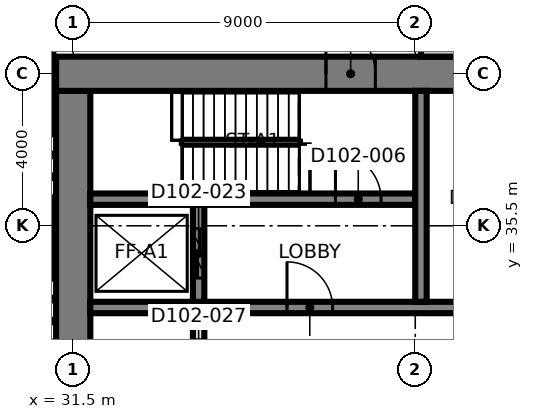
"""IFC4 building model, lengths in metres.
Left out: names, types, materials, properties, quantities, classifications, styles, units other than length and angle.
Written with IfcOpenShell. Run it as: python <this file> out.ifc"""

import sys

from ifc_helpers import new_model, si_unit, direction, frame, frame_2d, origin, place, context, subcontext, project, spatial, rectangle, extrude, element, fill, save


model = new_model("IFC4")
c1 = context("Model", 3, precision=1e-05, world=origin(), true_north=direction((0.0, 1.0)))
c2 = subcontext(c1, "Body", "Model", "MODEL_VIEW")
j1 = project(units=[si_unit("LENGTHUNIT", "METRE"), si_unit("PLANEANGLEUNIT", "RADIAN")], contexts=[c1])
p1 = place(None, origin())
s1 = spatial("IfcSite", under=j1, at=p1, CompositionType="ELEMENT")
p2 = place(p1, origin())
s2 = spatial("IfcBuilding", under=s1, at=p2, CompositionType="ELEMENT")
p3 = place(p2, origin())
s3 = spatial("IfcBuildingStorey", under=s2, at=p3, CompositionType="ELEMENT", Elevation=0.0)
p4 = place(p3, frame((31.5, 21.95, 0.0), z_axis=(0.0, 0.0, 1.0), x_axis=(0.0, 1.0, 0.0)))
e1 = element("IfcWall", 1, at=p4, inside=s3, PredefinedType="SHEAR", context=c2, shape_type="SweptSolid", body=[
    extrude(rectangle(XDim=17.1, YDim=0.9, at=frame_2d((8.55, 0.0))), origin(), (0.0, 0.0, 1.0), 8.0),
])
p5 = place(p3, frame((31.05, 39.5, 0.0), z_axis=(0.0, 0.0, 1.0), x_axis=(1.0, 0.0, 0.0)))
e2 = element("IfcWall", 2, at=p5, inside=s3, PredefinedType="SHEAR", context=c2, shape_type="SweptSolid", body=[
    extrude(rectangle(XDim=27.0, YDim=0.9, at=frame_2d((13.5, 0.0))), origin(), (0.0, 0.0, 1.0), 8.0),
])
p6 = place(p5, frame((7.1, 0.0, 0.0)))
e3 = element("IfcOpeningElement", 3, at=p6, cuts=e2, PredefinedType="OPENING", context=c2, shape_type="SweptSolid", body=[
    extrude(rectangle(XDim=1.3, YDim=2.1, at=frame_2d((0.65, 1.05))), frame((0.0, 0.46, 0.0), z_axis=(0.0, -1.0, 0.0), x_axis=(1.0, 0.0, 0.0)), (0.0, 0.0, 1.0), 0.92),
])
p7 = place(p5, frame((18.475, 0.0, 0.0)))
e4 = element("IfcOpeningElement", 4, at=p7, cuts=e2, PredefinedType="OPENING", context=c2, shape_type="SweptSolid", body=[
    extrude(rectangle(XDim=0.95, YDim=2.1, at=frame_2d((0.475, 1.05))), frame((0.0, 0.46, 0.0), z_axis=(0.0, -1.0, 0.0), x_axis=(1.0, 0.0, 0.0)), (0.0, 0.0, 1.0), 0.92),
])
p8 = place(p3, frame((31.95, 33.35, 0.0), z_axis=(0.0, 0.0, 1.0), x_axis=(1.0, 0.0, 0.0)))
e5 = element("IfcWall", 5, at=p8, inside=s3, PredefinedType="SHEAR", context=c2, shape_type="SweptSolid", body=[
    extrude(rectangle(XDim=26.1, YDim=0.3, at=frame_2d((13.05, 0.0))), origin(), (0.0, 0.0, 1.0), 8.0),
])
p9 = place(p8, frame((13.7, 0.0, 0.0)))
e6 = element("IfcOpeningElement", 6, at=p9, cuts=e5, PredefinedType="OPENING", context=c2, shape_type="SweptSolid", body=[
    extrude(rectangle(XDim=1.4, YDim=2.1, at=frame_2d((0.7, 1.05))), frame((0.0, 0.16, 0.0), z_axis=(0.0, -1.0, 0.0), x_axis=(1.0, 0.0, 0.0)), (0.0, 0.0, 1.0), 0.32),
])
p10 = place(p8, frame((5.175, 0.0, 0.0)))
e7 = element("IfcOpeningElement", 7, at=p10, cuts=e5, PredefinedType="OPENING", context=c2, shape_type="SweptSolid", body=[
    extrude(rectangle(XDim=1.2, YDim=2.1, at=frame_2d((0.6, 1.05))), frame((0.0, 0.16, 0.0), z_axis=(0.0, -1.0, 0.0), x_axis=(1.0, 0.0, 0.0)), (0.0, 0.0, 1.0), 0.32),
])
p11 = place(p8, frame((19.725, 0.0, 0.0)))
e8 = element("IfcOpeningElement", 8, at=p11, cuts=e5, PredefinedType="OPENING", context=c2, shape_type="SweptSolid", body=[
    extrude(rectangle(XDim=1.2, YDim=2.1, at=frame_2d((0.6, 1.05))), frame((0.0, 0.16, 0.0), z_axis=(0.0, -1.0, 0.0), x_axis=(1.0, 0.0, 0.0)), (0.0, 0.0, 1.0), 0.32),
])
p12 = place(p3, frame((31.95, 36.2, 0.0), z_axis=(0.0, 0.0, 1.0), x_axis=(1.0, 0.0, 0.0)))
e9 = element("IfcWall", 9, at=p12, inside=s3, PredefinedType="SHEAR", context=c2, shape_type="SweptSolid", body=[
    extrude(rectangle(XDim=8.55, YDim=0.3, at=frame_2d((4.275, 0.0))), origin(), (0.0, 0.0, 1.0), 8.0),
])
p13 = place(p12, frame((6.45, 0.0, 0.0)))
e10 = element("IfcOpeningElement", 10, at=p13, cuts=e9, PredefinedType="OPENING", context=c2, shape_type="SweptSolid", body=[
    extrude(rectangle(XDim=1.2, YDim=2.1, at=frame_2d((0.6, 1.05))), frame((0.0, 0.16, 0.0), z_axis=(0.0, -1.0, 0.0), x_axis=(1.0, 0.0, 0.0)), (0.0, 0.0, 1.0), 0.32),
])
p14 = place(p3, frame((40.65, 33.5, 0.0), z_axis=(0.0, 0.0, 1.0), x_axis=(0.0, 1.0, 0.0)))
e11 = element("IfcWall", 11, at=p14, inside=s3, PredefinedType="SHEAR", context=c2, shape_type="SweptSolid", body=[
    extrude(rectangle(XDim=5.55, YDim=0.3, at=frame_2d((2.775, 0.0))), origin(), (0.0, 0.0, 1.0), 8.0),
])
p15 = place(p3, frame((34.8, 33.5, 0.0), z_axis=(0.0, 0.0, 1.0), x_axis=(0.0, 1.0, 0.0)))
e12 = element("IfcWall", 12, at=p15, inside=s3, PredefinedType="SHEAR", context=c2, shape_type="SweptSolid", body=[
    extrude(rectangle(XDim=2.55, YDim=0.3, at=frame_2d((1.275, 0.0))), origin(), (0.0, 0.0, 1.0), 8.0),
])
p16 = place(p15, frame((0.625, 0.0, 0.0)))
e13 = element("IfcOpeningElement", 13, at=p16, cuts=e12, PredefinedType="OPENING", context=c2, shape_type="SweptSolid", body=[
    extrude(rectangle(XDim=1.3, YDim=2.4, at=frame_2d((0.65, 1.2))), frame((0.0, 0.16, 0.0), z_axis=(0.0, -1.0, 0.0), x_axis=(1.0, 0.0, 0.0)), (0.0, 0.0, 1.0), 0.32),
])
p17 = place(p3, frame((40.65, 40.1, 0.0), z_axis=(0.0, 0.0, 1.0), x_axis=(1.0, 0.0, 0.0)))
e14 = element("IfcWall", 14, at=p17, inside=s3, PredefinedType="PARTITIONING", context=c2, shape_type="SweptSolid", body=[
    extrude(rectangle(XDim=2.7, YDim=0.3, at=frame_2d((1.35, 0.0))), origin(), (0.0, 0.0, 1.0), 7.7),
])
p18 = place(p3, frame((34.8, 27.9, 0.0), z_axis=(0.0, 0.0, 1.0), x_axis=(0.0, 1.0, 0.0)))
e15 = element("IfcWall", 15, at=p18, inside=s3, PredefinedType="SOLIDWALL", context=c2, shape_type="SweptSolid", body=[
    extrude(rectangle(XDim=5.45, YDim=0.3, at=frame_2d((2.725, 0.0))), origin(), (0.0, 0.0, 1.0), 7.7),
])
p19 = place(p18, frame((3.6, 0.0, 0.0)))
e16 = element("IfcOpeningElement", 16, at=p19, cuts=e15, PredefinedType="OPENING", context=c2, shape_type="SweptSolid", body=[
    extrude(rectangle(XDim=1.0, YDim=2.1, at=frame_2d((0.5, 1.05))), frame((0.0, 0.16, 0.0), z_axis=(0.0, -1.0, 0.0), x_axis=(1.0, 0.0, 0.0)), (0.0, 0.0, 1.0), 0.32),
])
p20 = place(p10, origin())
e17 = element("IfcDoor", 17, at=p20, inside=s3, OperationType="SINGLE_SWING_LEFT", PredefinedType="DOOR", context=c2, shape_type="SweptSolid", body=[
    extrude(rectangle(XDim=1.2, YDim=2.1, at=frame_2d((0.6, 1.05))), frame((0.0, 0.025, 0.0), z_axis=(0.0, -1.0, 0.0), x_axis=(1.0, 0.0, 0.0)), (0.0, 0.0, 1.0), 0.05),
])
fill(e7, e17)
p21 = place(p13, origin())
e18 = element("IfcDoor", 18, at=p21, inside=s3, OperationType="SINGLE_SWING_RIGHT", PredefinedType="DOOR", context=c2, shape_type="SweptSolid", body=[
    extrude(rectangle(XDim=1.2, YDim=2.1, at=frame_2d((0.6, 1.05))), frame((0.0, 0.025, 0.0), z_axis=(0.0, -1.0, 0.0), x_axis=(1.0, 0.0, 0.0)), (0.0, 0.0, 1.0), 0.05),
])
fill(e10, e18)
p22 = place(p6, origin())
e19 = element("IfcDoor", 19, at=p22, inside=s3, OperationType="SINGLE_SWING_LEFT", PredefinedType="DOOR", context=c2, shape_type="SweptSolid", body=[
    extrude(rectangle(XDim=1.3, YDim=2.1, at=frame_2d((0.65, 1.05))), frame((0.0, 0.025, 0.0), z_axis=(0.0, -1.0, 0.0), x_axis=(1.0, 0.0, 0.0)), (0.0, 0.0, 1.0), 0.05),
])
fill(e3, e19)
p23 = place(p16, origin())
e20 = element("IfcDoor", 20, at=p23, inside=s3, OperationType="SLIDING_TO_LEFT", PredefinedType="DOOR", context=c2, shape_type="SweptSolid", body=[
    extrude(rectangle(XDim=1.3, YDim=2.4, at=frame_2d((0.65, 1.2))), frame((0.0, 0.025, 0.0), z_axis=(0.0, -1.0, 0.0), x_axis=(1.0, 0.0, 0.0)), (0.0, 0.0, 1.0), 0.05),
])
fill(e13, e20)
save(model, sys.argv[1])
